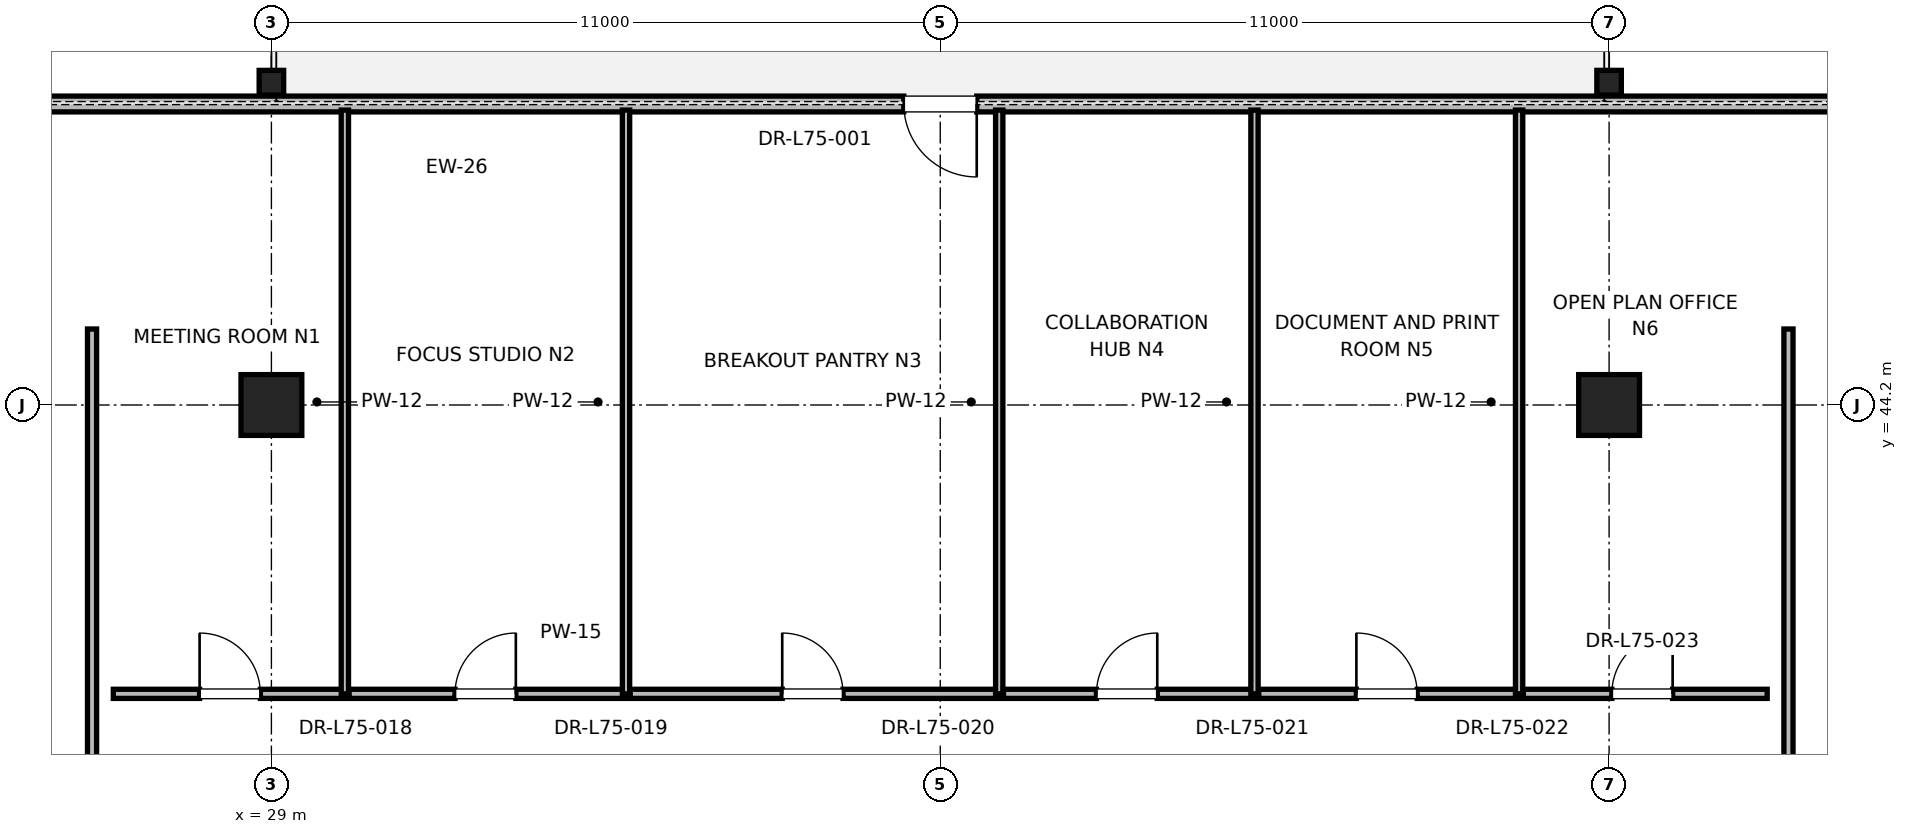
"""IFC4 building model, lengths in metres.
Left out: names, types, materials, properties, quantities, classifications, styles, units other than length and angle.
Written with IfcOpenShell. Run it as: python <this file> out.ifc"""

import sys

from ifc_helpers import new_model, si_unit, direction, frame, frame_2d, origin, origin_2d, place, context, subcontext, project, spatial, rectangle, i_section, extrude, element, fill, save


model = new_model("IFC4")
c1 = context("Model", 3, precision=1e-05, world=origin(), true_north=direction((0.0, 1.0)))
c2 = subcontext(c1, "Body", "Model", "MODEL_VIEW")
j1 = project(units=[si_unit("LENGTHUNIT", "METRE"), si_unit("PLANEANGLEUNIT", "RADIAN")], contexts=[c1])
p1 = place(None, origin())
s1 = spatial("IfcSite", under=j1, at=p1, CompositionType="ELEMENT")
p2 = place(p1, origin())
s2 = spatial("IfcBuilding", under=s1, at=p2, CompositionType="ELEMENT")
p3 = place(p2, frame((0.0, 0.0, 322.8)))
s3 = spatial("IfcBuildingStorey", under=s2, at=p3, CompositionType="ELEMENT", Elevation=322.8)
for number, where, z_axis, x_axis in (
    (1, (29.0, 44.2, 0.0), (0.0, 0.0, 1.0), (1.0, 0.0, 0.0)),
    (2, (51.0, 44.2, 0.0), (0.0, 0.0, 1.0), (1.0, 0.0, 0.0)),
):
    element("IfcColumn", number, at=place(p3, frame(where, z_axis=z_axis, x_axis=x_axis)), inside=s3, PredefinedType="COLUMN", context=c2, shape_type="SweptSolid", body=[
        extrude(rectangle(XDim=1.0, YDim=1.0, at=origin_2d()), origin(), (0.0, 0.0, 1.0), 4.0),
    ])
for number, where, z_axis, x_axis in (
    (3, (29.0, 49.5, 0.0), (0.0, 0.0, 1.0), (1.0, 0.0, 0.0)),
    (4, (51.0, 49.5, 0.0), (0.0, 0.0, 1.0), (1.0, 0.0, 0.0)),
):
    element("IfcColumn", number, at=place(p3, frame(where, z_axis=z_axis, x_axis=x_axis)), inside=s3, PredefinedType="COLUMN", context=c2, shape_type="SweptSolid", body=[
        extrude(i_section(OverallWidth=0.403, OverallDepth=0.406, WebThickness=0.027, FlangeThickness=0.043, FilletRadius=0.015, at=origin_2d()), origin(), (0.0, 0.0, 1.0), 4.0),
    ])
p4 = place(p3, frame((61.1, 49.15, 0.0), z_axis=(0.0, 0.0, 1.0), x_axis=(-1.0, 0.0, 0.0)))
e5 = element("IfcWall", 5, at=p4, inside=s3, PredefinedType="PARAPET", context=c2, shape_type="SweptSolid", body=[
    extrude(rectangle(XDim=42.2, YDim=0.26, at=frame_2d((21.1, 0.0))), origin(), (0.0, 0.0, 1.0), 3.196),
])
p5 = place(p4, frame((4.2, 0.0, 0.85)))
e6 = element("IfcOpeningElement", 6, at=p5, cuts=e5, PredefinedType="OPENING", context=c2, shape_type="SweptSolid", body=[
    extrude(rectangle(XDim=1.6, YDim=2.1, at=frame_2d((0.8, 1.05))), frame((0.0, 0.13, 0.0), z_axis=(0.0, -1.0, 0.0), x_axis=(1.0, 0.0, 0.0)), (0.0, 0.0, 1.0), 0.26),
])
p6 = place(p4, frame((20.5, 0.0, 0.0)))
e7 = element("IfcOpeningElement", 7, at=p6, cuts=e5, PredefinedType="OPENING", context=c2, shape_type="SweptSolid", body=[
    extrude(rectangle(XDim=1.2, YDim=2.2, at=frame_2d((0.6, 1.1))), frame((0.0, 0.13, 0.0), z_axis=(0.0, -1.0, 0.0), x_axis=(1.0, 0.0, 0.0)), (0.0, 0.0, 1.0), 0.26),
])
p7 = place(p4, frame((36.4, 0.0, 0.85)))
e8 = element("IfcOpeningElement", 8, at=p7, cuts=e5, PredefinedType="OPENING", context=c2, shape_type="SweptSolid", body=[
    extrude(rectangle(XDim=1.6, YDim=2.1, at=frame_2d((0.8, 1.05))), frame((0.0, 0.13, 0.0), z_axis=(0.0, -1.0, 0.0), x_axis=(1.0, 0.0, 0.0)), (0.0, 0.0, 1.0), 0.26),
])
p8 = place(p3, frame((26.4, 39.45, 0.0), z_axis=(0.0, 0.0, 1.0), x_axis=(1.0, 0.0, 0.0)))
e9 = element("IfcWall", 9, at=p8, inside=s3, PredefinedType="PARTITIONING", context=c2, shape_type="SweptSolid", body=[
    extrude(rectangle(XDim=3.808, YDim=0.15, at=frame_2d((1.904, 0.0))), origin(), (0.0, 0.0, 1.0), 2.85),
])
p9 = place(p8, frame((1.419, 0.0, 0.0)))
e10 = element("IfcOpeningElement", 10, at=p9, cuts=e9, PredefinedType="OPENING", context=c2, shape_type="SweptSolid", body=[
    extrude(rectangle(XDim=1.0, YDim=2.15, at=frame_2d((0.5, 1.075))), frame((0.0, 0.075, 0.0), z_axis=(0.0, -1.0, 0.0), x_axis=(1.0, 0.0, 0.0)), (0.0, 0.0, 1.0), 0.15),
])
p10 = place(p3, frame((30.208, 39.45, 0.0), z_axis=(0.0, 0.0, 1.0), x_axis=(0.0, 1.0, 0.0)))
e11 = element("IfcWall", 11, at=p10, inside=s3, PredefinedType="PARTITIONING", context=c2, shape_type="SweptSolid", body=[
    extrude(rectangle(XDim=9.6, YDim=0.12, at=frame_2d((4.8, 0.0))), origin(), (0.0, 0.0, 1.0), 2.415),
])
p11 = place(p3, frame((30.278, 39.45, 0.0), z_axis=(0.0, 0.0, 1.0), x_axis=(1.0, 0.0, 0.0)))
e12 = element("IfcWall", 12, at=p11, inside=s3, PredefinedType="PARTITIONING", context=c2, shape_type="SweptSolid", body=[
    extrude(rectangle(XDim=4.554, YDim=0.15, at=frame_2d((2.277, 0.0))), origin(), (0.0, 0.0, 1.0), 2.85),
])
p12 = place(p11, frame((1.742, 0.0, 0.0)))
e13 = element("IfcOpeningElement", 13, at=p12, cuts=e12, PredefinedType="OPENING", context=c2, shape_type="SweptSolid", body=[
    extrude(rectangle(XDim=1.0, YDim=2.15, at=frame_2d((0.5, 1.075))), frame((0.0, 0.075, 0.0), z_axis=(0.0, -1.0, 0.0), x_axis=(1.0, 0.0, 0.0)), (0.0, 0.0, 1.0), 0.15),
])
p13 = place(p3, frame((34.832, 39.45, 0.0), z_axis=(0.0, 0.0, 1.0), x_axis=(0.0, 1.0, 0.0)))
e14 = element("IfcWall", 14, at=p13, inside=s3, PredefinedType="PARTITIONING", context=c2, shape_type="SweptSolid", body=[
    extrude(rectangle(XDim=9.6, YDim=0.12, at=frame_2d((4.8, 0.0))), origin(), (0.0, 0.0, 1.0), 2.415),
])
p14 = place(p3, frame((34.902, 39.45, 0.0), z_axis=(0.0, 0.0, 1.0), x_axis=(1.0, 0.0, 0.0)))
e15 = element("IfcWall", 15, at=p14, inside=s3, PredefinedType="PARTITIONING", context=c2, shape_type="SweptSolid", body=[
    extrude(rectangle(XDim=6.068, YDim=0.15, at=frame_2d((3.034, 0.0))), origin(), (0.0, 0.0, 1.0), 2.85),
])
p15 = place(p14, frame((2.499, 0.0, 0.0)))
e16 = element("IfcOpeningElement", 16, at=p15, cuts=e15, PredefinedType="OPENING", context=c2, shape_type="SweptSolid", body=[
    extrude(rectangle(XDim=1.0, YDim=2.15, at=frame_2d((0.5, 1.075))), frame((0.0, 0.075, 0.0), z_axis=(0.0, -1.0, 0.0), x_axis=(1.0, 0.0, 0.0)), (0.0, 0.0, 1.0), 0.15),
])
p16 = place(p3, frame((40.97, 39.45, 0.0), z_axis=(0.0, 0.0, 1.0), x_axis=(0.0, 1.0, 0.0)))
e17 = element("IfcWall", 17, at=p16, inside=s3, PredefinedType="PARTITIONING", context=c2, shape_type="SweptSolid", body=[
    extrude(rectangle(XDim=9.6, YDim=0.12, at=frame_2d((4.8, 0.0))), origin(), (0.0, 0.0, 1.0), 2.415),
])
p17 = place(p3, frame((41.04, 39.45, 0.0), z_axis=(0.0, 0.0, 1.0), x_axis=(1.0, 0.0, 0.0)))
e18 = element("IfcWall", 18, at=p17, inside=s3, PredefinedType="PARTITIONING", context=c2, shape_type="SweptSolid", body=[
    extrude(rectangle(XDim=4.128, YDim=0.15, at=frame_2d((2.064, 0.0))), origin(), (0.0, 0.0, 1.0), 2.85),
])
p18 = place(p17, frame((1.529, 0.0, 0.0)))
e19 = element("IfcOpeningElement", 19, at=p18, cuts=e18, PredefinedType="OPENING", context=c2, shape_type="SweptSolid", body=[
    extrude(rectangle(XDim=1.0, YDim=2.15, at=frame_2d((0.5, 1.075))), frame((0.0, 0.075, 0.0), z_axis=(0.0, -1.0, 0.0), x_axis=(1.0, 0.0, 0.0)), (0.0, 0.0, 1.0), 0.15),
])
p19 = place(p3, frame((45.168, 39.45, 0.0), z_axis=(0.0, 0.0, 1.0), x_axis=(0.0, 1.0, 0.0)))
e20 = element("IfcWall", 20, at=p19, inside=s3, PredefinedType="PARTITIONING", context=c2, shape_type="SweptSolid", body=[
    extrude(rectangle(XDim=9.6, YDim=0.12, at=frame_2d((4.8, 0.0))), origin(), (0.0, 0.0, 1.0), 2.415),
])
p20 = place(p3, frame((45.238, 39.45, 0.0), z_axis=(0.0, 0.0, 1.0), x_axis=(1.0, 0.0, 0.0)))
e21 = element("IfcWall", 21, at=p20, inside=s3, PredefinedType="PARTITIONING", context=c2, shape_type="SweptSolid", body=[
    extrude(rectangle(XDim=4.282, YDim=0.15, at=frame_2d((2.141, 0.0))), origin(), (0.0, 0.0, 1.0), 2.85),
])
p21 = place(p20, frame((1.606, 0.0, 0.0)))
e22 = element("IfcOpeningElement", 22, at=p21, cuts=e21, PredefinedType="OPENING", context=c2, shape_type="SweptSolid", body=[
    extrude(rectangle(XDim=1.0, YDim=2.15, at=frame_2d((0.5, 1.075))), frame((0.0, 0.075, 0.0), z_axis=(0.0, -1.0, 0.0), x_axis=(1.0, 0.0, 0.0)), (0.0, 0.0, 1.0), 0.15),
])
p22 = place(p3, frame((49.52, 39.45, 0.0), z_axis=(0.0, 0.0, 1.0), x_axis=(0.0, 1.0, 0.0)))
e23 = element("IfcWall", 23, at=p22, inside=s3, PredefinedType="PARTITIONING", context=c2, shape_type="SweptSolid", body=[
    extrude(rectangle(XDim=9.6, YDim=0.12, at=frame_2d((4.8, 0.0))), origin(), (0.0, 0.0, 1.0), 2.415),
])
p23 = place(p3, frame((49.59, 39.45, 0.0), z_axis=(0.0, 0.0, 1.0), x_axis=(1.0, 0.0, 0.0)))
e24 = element("IfcWall", 24, at=p23, inside=s3, PredefinedType="PARTITIONING", context=c2, shape_type="SweptSolid", body=[
    extrude(rectangle(XDim=4.01, YDim=0.15, at=frame_2d((2.005, 0.0))), origin(), (0.0, 0.0, 1.0), 2.85),
])
p24 = place(p23, frame((1.455, 0.0, 0.0)))
e25 = element("IfcOpeningElement", 25, at=p24, cuts=e24, PredefinedType="OPENING", context=c2, shape_type="SweptSolid", body=[
    extrude(rectangle(XDim=1.0, YDim=2.15, at=frame_2d((0.5, 1.075))), frame((0.0, 0.075, 0.0), z_axis=(0.0, -1.0, 0.0), x_axis=(1.0, 0.0, 0.0)), (0.0, 0.0, 1.0), 0.15),
])
p25 = place(p3, frame((26.05, 34.75, 0.0), z_axis=(0.0, 0.0, 1.0), x_axis=(0.0, 1.0, 0.0)))
e26 = element("IfcWall", 26, at=p25, inside=s3, PredefinedType="PARTITIONING", context=c2, shape_type="SweptSolid", body=[
    extrude(rectangle(XDim=10.7, YDim=0.15, at=frame_2d((5.35, 0.0))), origin(), (0.0, 0.0, 1.0), 2.85),
])
p26 = place(p25, frame((0.325, 0.0, 0.0)))
e27 = element("IfcOpeningElement", 27, at=p26, cuts=e26, PredefinedType="OPENING", context=c2, shape_type="SweptSolid", body=[
    extrude(rectangle(XDim=1.0, YDim=2.15, at=frame_2d((0.5, 1.075))), frame((0.0, 0.075, 0.0), z_axis=(0.0, -1.0, 0.0), x_axis=(1.0, 0.0, 0.0)), (0.0, 0.0, 1.0), 0.15),
])
p27 = place(p3, frame((53.95, 24.698, 0.0), z_axis=(0.0, 0.0, 1.0), x_axis=(0.0, 1.0, 0.0)))
e28 = element("IfcWall", 28, at=p27, inside=s3, PredefinedType="PARTITIONING", context=c2, shape_type="SweptSolid", body=[
    extrude(rectangle(XDim=20.752, YDim=0.15, at=frame_2d((10.376, 0.0))), origin(), (0.0, 0.0, 1.0), 2.85),
])
p28 = place(p27, frame((5.351, 0.0, 0.0)))
e29 = element("IfcOpeningElement", 29, at=p28, cuts=e28, PredefinedType="OPENING", context=c2, shape_type="SweptSolid", body=[
    extrude(rectangle(XDim=1.0, YDim=2.15, at=frame_2d((0.5, 1.075))), frame((0.0, 0.075, 0.0), z_axis=(0.0, -1.0, 0.0), x_axis=(1.0, 0.0, 0.0)), (0.0, 0.0, 1.0), 0.15),
])
p29 = place(p6, origin())
e30 = element("IfcDoor", 30, at=p29, inside=s3, OperationType="SINGLE_SWING_LEFT", PredefinedType="DOOR", context=c2, shape_type="SweptSolid", body=[
    extrude(rectangle(XDim=1.2, YDim=2.2, at=frame_2d((0.6, 1.1))), frame((0.0, 0.025, 0.0), z_axis=(0.0, -1.0, 0.0), x_axis=(1.0, 0.0, 0.0)), (0.0, 0.0, 1.0), 0.05),
])
fill(e7, e30)
p30 = place(p9, origin())
e31 = element("IfcDoor", 31, at=p30, inside=s3, OperationType="SINGLE_SWING_LEFT", PredefinedType="DOOR", context=c2, shape_type="SweptSolid", body=[
    extrude(rectangle(XDim=1.0, YDim=2.15, at=frame_2d((0.5, 1.075))), frame((0.0, 0.025, 0.0), z_axis=(0.0, -1.0, 0.0), x_axis=(1.0, 0.0, 0.0)), (0.0, 0.0, 1.0), 0.05),
])
fill(e10, e31)
p31 = place(p12, origin())
e32 = element("IfcDoor", 32, at=p31, inside=s3, OperationType="SINGLE_SWING_RIGHT", PredefinedType="DOOR", context=c2, shape_type="SweptSolid", body=[
    extrude(rectangle(XDim=1.0, YDim=2.15, at=frame_2d((0.5, 1.075))), frame((0.0, 0.025, 0.0), z_axis=(0.0, -1.0, 0.0), x_axis=(1.0, 0.0, 0.0)), (0.0, 0.0, 1.0), 0.05),
])
fill(e13, e32)
p32 = place(p15, origin())
e33 = element("IfcDoor", 33, at=p32, inside=s3, OperationType="SINGLE_SWING_LEFT", PredefinedType="DOOR", context=c2, shape_type="SweptSolid", body=[
    extrude(rectangle(XDim=1.0, YDim=2.15, at=frame_2d((0.5, 1.075))), frame((0.0, 0.025, 0.0), z_axis=(0.0, -1.0, 0.0), x_axis=(1.0, 0.0, 0.0)), (0.0, 0.0, 1.0), 0.05),
])
fill(e16, e33)
p33 = place(p18, origin())
e34 = element("IfcDoor", 34, at=p33, inside=s3, OperationType="SINGLE_SWING_RIGHT", PredefinedType="DOOR", context=c2, shape_type="SweptSolid", body=[
    extrude(rectangle(XDim=1.0, YDim=2.15, at=frame_2d((0.5, 1.075))), frame((0.0, 0.025, 0.0), z_axis=(0.0, -1.0, 0.0), x_axis=(1.0, 0.0, 0.0)), (0.0, 0.0, 1.0), 0.05),
])
fill(e19, e34)
p34 = place(p21, origin())
e35 = element("IfcDoor", 35, at=p34, inside=s3, OperationType="SINGLE_SWING_LEFT", PredefinedType="DOOR", context=c2, shape_type="SweptSolid", body=[
    extrude(rectangle(XDim=1.0, YDim=2.15, at=frame_2d((0.5, 1.075))), frame((0.0, 0.025, 0.0), z_axis=(0.0, -1.0, 0.0), x_axis=(1.0, 0.0, 0.0)), (0.0, 0.0, 1.0), 0.05),
])
fill(e22, e35)
p35 = place(p24, origin())
e36 = element("IfcDoor", 36, at=p35, inside=s3, OperationType="SINGLE_SWING_RIGHT", PredefinedType="DOOR", context=c2, shape_type="SweptSolid", body=[
    extrude(rectangle(XDim=1.0, YDim=2.15, at=frame_2d((0.5, 1.075))), frame((0.0, 0.025, 0.0), z_axis=(0.0, -1.0, 0.0), x_axis=(1.0, 0.0, 0.0)), (0.0, 0.0, 1.0), 0.05),
])
fill(e25, e36)
save(model, sys.argv[1])
